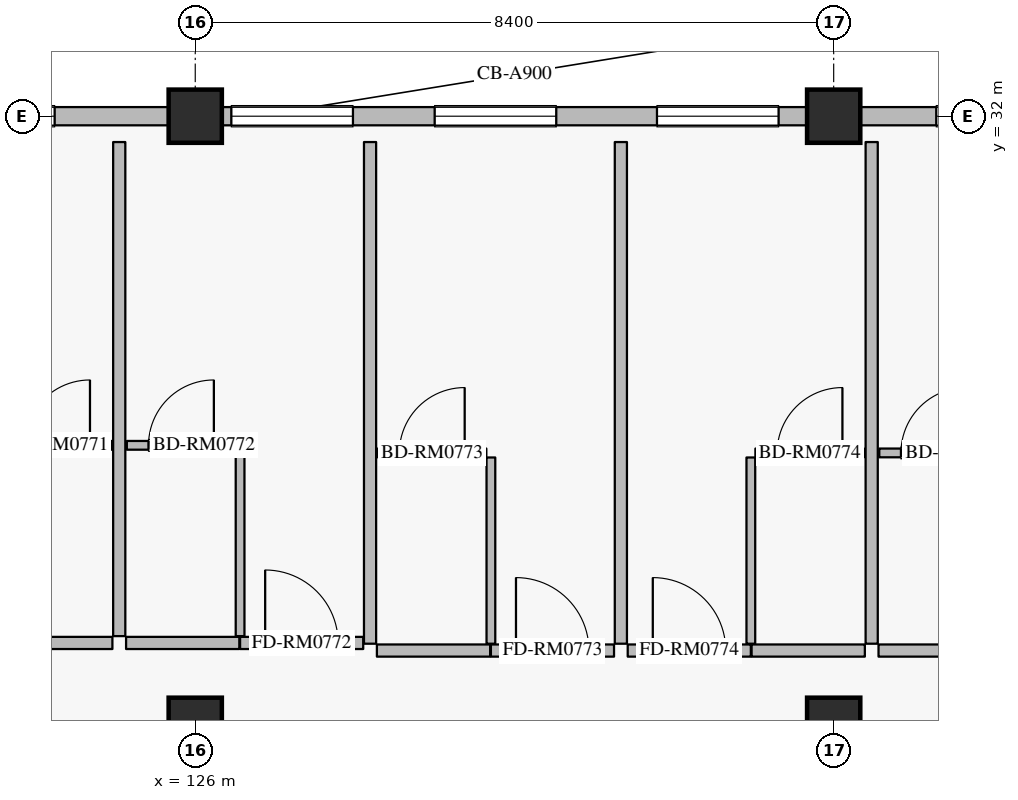
"""IFC4 building model, lengths in metres.
Left out: names, types, materials, properties, quantities, classifications, styles, units other than length and angle.
Written with IfcOpenShell. Run it as: python <this file> out.ifc"""

import sys

from ifc_helpers import new_model, si_unit, direction, frame, frame_2d, origin, origin_2d, place, context, subcontext, project, spatial, rectangle, extrude, element, fill, save


model = new_model("IFC4")
c1 = context("Model", 3, precision=1e-05, world=origin(), true_north=direction((0.0, 1.0)))
c2 = subcontext(c1, "Body", "Model", "MODEL_VIEW")
j1 = project(units=[si_unit("LENGTHUNIT", "METRE"), si_unit("PLANEANGLEUNIT", "RADIAN")], contexts=[c1])
p1 = place(None, origin())
s1 = spatial("IfcSite", under=j1, at=p1, CompositionType="ELEMENT")
p2 = place(p1, origin())
s2 = spatial("IfcBuilding", under=s1, at=p2, CompositionType="ELEMENT")
p3 = place(p2, frame((0.0, 0.0, 28.8)))
s3 = spatial("IfcBuildingStorey", under=s2, at=p3, CompositionType="ELEMENT", Elevation=28.8)
for number, where, z_axis, x_axis in (
    (1, (126.0, 32.0, 0.0), (0.0, 0.0, 1.0), (1.0, 0.0, 0.0)),
    (2, (134.4, 32.0, 0.0), (0.0, 0.0, 1.0), (1.0, 0.0, 0.0)),
    (3, (126.0, 24.0, 0.0), (0.0, 0.0, 1.0), (1.0, 0.0, 0.0)),
    (4, (134.4, 24.0, 0.0), (0.0, 0.0, 1.0), (1.0, 0.0, 0.0)),
):
    element("IfcColumn", number, at=place(p3, frame(where, z_axis=z_axis, x_axis=x_axis)), inside=s3, PredefinedType="COLUMN", context=c2, shape_type="SweptSolid", body=[
        extrude(rectangle(XDim=0.7, YDim=0.7, at=origin_2d()), origin(), (0.0, 0.0, 1.0), 3.6),
    ])
p4 = place(p3, frame((117.95, 32.0, 0.0), z_axis=(0.0, 0.0, 1.0), x_axis=(1.0, 0.0, 0.0)))
e5 = element("IfcWall", 5, at=p4, inside=s3, PredefinedType="SOLIDWALL", context=c2, shape_type="SweptSolid", body=[
    extrude(rectangle(XDim=7.7, YDim=0.24, at=frame_2d((3.85, 0.0))), origin(), (0.0, 0.0, 1.0), 2.93),
])
p5 = place(p4, frame((1.3, 0.0, 0.8)))
e6 = element("IfcOpeningElement", 6, at=p5, cuts=e5, PredefinedType="OPENING", context=c2, shape_type="SweptSolid", body=[
    extrude(rectangle(XDim=1.6, YDim=1.6, at=frame_2d((0.8, 0.8))), frame((0.0, 0.13, 0.0), z_axis=(0.0, -1.0, 0.0), x_axis=(1.0, 0.0, 0.0)), (0.0, 0.0, 1.0), 0.26),
])
p6 = place(p4, frame((4.6, 0.0, 0.8)))
e7 = element("IfcOpeningElement", 7, at=p6, cuts=e5, PredefinedType="OPENING", context=c2, shape_type="SweptSolid", body=[
    extrude(rectangle(XDim=1.6, YDim=1.6, at=frame_2d((0.8, 0.8))), frame((0.0, 0.13, 0.0), z_axis=(0.0, -1.0, 0.0), x_axis=(1.0, 0.0, 0.0)), (0.0, 0.0, 1.0), 0.26),
])
p7 = place(p3, frame((126.35, 32.0, 0.0), z_axis=(0.0, 0.0, 1.0), x_axis=(1.0, 0.0, 0.0)))
e8 = element("IfcWall", 8, at=p7, inside=s3, PredefinedType="SOLIDWALL", context=c2, shape_type="SweptSolid", body=[
    extrude(rectangle(XDim=7.7, YDim=0.24, at=frame_2d((3.85, 0.0))), origin(), (0.0, 0.0, 1.0), 2.93),
])
p8 = place(p7, frame((0.125, 0.0, 0.8)))
e9 = element("IfcOpeningElement", 9, at=p8, cuts=e8, PredefinedType="OPENING", context=c2, shape_type="SweptSolid", body=[
    extrude(rectangle(XDim=1.6, YDim=1.6, at=frame_2d((0.8, 0.8))), frame((0.0, 0.13, 0.0), z_axis=(0.0, -1.0, 0.0), x_axis=(1.0, 0.0, 0.0)), (0.0, 0.0, 1.0), 0.26),
])
p9 = place(p7, frame((2.8, 0.0, 0.8)))
e10 = element("IfcOpeningElement", 10, at=p9, cuts=e8, PredefinedType="OPENING", context=c2, shape_type="SweptSolid", body=[
    extrude(rectangle(XDim=1.6, YDim=1.6, at=frame_2d((0.8, 0.8))), frame((0.0, 0.13, 0.0), z_axis=(0.0, -1.0, 0.0), x_axis=(1.0, 0.0, 0.0)), (0.0, 0.0, 1.0), 0.26),
])
p10 = place(p7, frame((5.725, 0.0, 0.8)))
e11 = element("IfcOpeningElement", 11, at=p10, cuts=e8, PredefinedType="OPENING", context=c2, shape_type="SweptSolid", body=[
    extrude(rectangle(XDim=1.6, YDim=1.6, at=frame_2d((0.8, 0.8))), frame((0.0, 0.13, 0.0), z_axis=(0.0, -1.0, 0.0), x_axis=(1.0, 0.0, 0.0)), (0.0, 0.0, 1.0), 0.26),
])
p11 = place(p3, frame((134.75, 32.0, 0.0), z_axis=(0.0, 0.0, 1.0), x_axis=(1.0, 0.0, 0.0)))
e12 = element("IfcWall", 12, at=p11, inside=s3, PredefinedType="SOLIDWALL", context=c2, shape_type="SweptSolid", body=[
    extrude(rectangle(XDim=7.7, YDim=0.24, at=frame_2d((3.85, 0.0))), origin(), (0.0, 0.0, 1.0), 2.93),
])
p12 = place(p11, frame((1.0, 0.0, 0.8)))
e13 = element("IfcOpeningElement", 13, at=p12, cuts=e12, PredefinedType="OPENING", context=c2, shape_type="SweptSolid", body=[
    extrude(rectangle(XDim=1.6, YDim=1.6, at=frame_2d((0.8, 0.8))), frame((0.0, 0.13, 0.0), z_axis=(0.0, -1.0, 0.0), x_axis=(1.0, 0.0, 0.0)), (0.0, 0.0, 1.0), 0.26),
])
p13 = place(p11, frame((4.3, 0.0, 0.8)))
e14 = element("IfcOpeningElement", 14, at=p13, cuts=e12, PredefinedType="OPENING", context=c2, shape_type="SweptSolid", body=[
    extrude(rectangle(XDim=1.6, YDim=1.6, at=frame_2d((0.8, 0.8))), frame((0.0, 0.13, 0.0), z_axis=(0.0, -1.0, 0.0), x_axis=(1.0, 0.0, 0.0)), (0.0, 0.0, 1.0), 0.26),
])
p14 = place(p3, frame((123.42, 25.07, 0.0), z_axis=(0.0, 0.0, 1.0), x_axis=(1.0, 0.0, 0.0)))
e15 = element("IfcWall", 15, at=p14, inside=s3, PredefinedType="PARTITIONING", context=c2, shape_type="SweptSolid", body=[
    extrude(rectangle(XDim=1.49, YDim=0.16, at=frame_2d((0.745, 0.0))), origin(), (0.0, 0.0, 1.0), 3.365),
])
p15 = place(p3, frame((123.47, 27.67, 0.0), z_axis=(0.0, 0.0, 1.0), x_axis=(1.0, 0.0, 0.0)))
e16 = element("IfcWall", 16, at=p15, inside=s3, PredefinedType="PARTITIONING", context=c2, shape_type="SweptSolid", body=[
    extrude(rectangle(XDim=1.43, YDim=0.115, at=frame_2d((0.715, 0.0))), origin(), (0.0, 0.0, 1.0), 3.365),
])
p16 = place(p15, frame((0.285, 0.0, 0.0)))
e17 = element("IfcOpeningElement", 17, at=p16, cuts=e16, PredefinedType="OPENING", context=c2, shape_type="SweptSolid", body=[
    extrude(rectangle(XDim=0.86, YDim=2.12, at=frame_2d((0.43, 1.06))), frame((0.0, 0.067, 0.0), z_axis=(0.0, -1.0, 0.0), x_axis=(1.0, 0.0, 0.0)), (0.0, 0.0, 1.0), 0.135),
])
p17 = place(p3, frame((125.09, 25.07, 0.0), z_axis=(0.0, 0.0, 1.0), x_axis=(1.0, 0.0, 0.0)))
e18 = element("IfcWall", 18, at=p17, inside=s3, PredefinedType="PARTITIONING", context=c2, shape_type="SweptSolid", body=[
    extrude(rectangle(XDim=1.49, YDim=0.16, at=frame_2d((0.745, 0.0))), origin(), (0.0, 0.0, 1.0), 3.365),
])
p18 = place(p3, frame((126.59, 25.07, 0.0), z_axis=(0.0, 0.0, 1.0), x_axis=(1.0, 0.0, 0.0)))
e19 = element("IfcWall", 19, at=p18, inside=s3, PredefinedType="PARTITIONING", context=c2, shape_type="SweptSolid", body=[
    extrude(rectangle(XDim=1.62, YDim=0.16, at=frame_2d((0.81, 0.0))), origin(), (0.0, 0.0, 1.0), 3.365),
])
p19 = place(p18, frame((0.33, 0.0, 0.0)))
e20 = element("IfcOpeningElement", 20, at=p19, cuts=e19, PredefinedType="OPENING", context=c2, shape_type="SweptSolid", body=[
    extrude(rectangle(XDim=0.96, YDim=2.2, at=frame_2d((0.48, 1.1))), frame((0.0, 0.09, 0.0), z_axis=(0.0, -1.0, 0.0), x_axis=(1.0, 0.0, 0.0)), (0.0, 0.0, 1.0), 0.18),
])
p20 = place(p3, frame((126.59, 25.16, 0.0), z_axis=(0.0, 0.0, 1.0), x_axis=(0.0, 1.0, 0.0)))
e21 = element("IfcWall", 21, at=p20, inside=s3, PredefinedType="PARTITIONING", context=c2, shape_type="SweptSolid", body=[
    extrude(rectangle(XDim=2.45, YDim=0.115, at=frame_2d((1.225, 0.0))), origin(), (0.0, 0.0, 1.0), 3.365),
])
p21 = place(p3, frame((125.1, 27.67, 0.0), z_axis=(0.0, 0.0, 1.0), x_axis=(1.0, 0.0, 0.0)))
e22 = element("IfcWall", 22, at=p21, inside=s3, PredefinedType="PARTITIONING", context=c2, shape_type="SweptSolid", body=[
    extrude(rectangle(XDim=1.43, YDim=0.115, at=frame_2d((0.715, 0.0))), origin(), (0.0, 0.0, 1.0), 3.365),
])
p22 = place(p21, frame((0.285, 0.0, 0.0)))
e23 = element("IfcOpeningElement", 23, at=p22, cuts=e22, PredefinedType="OPENING", context=c2, shape_type="SweptSolid", body=[
    extrude(rectangle(XDim=0.86, YDim=2.12, at=frame_2d((0.43, 1.06))), frame((0.0, 0.067, 0.0), z_axis=(0.0, -1.0, 0.0), x_axis=(1.0, 0.0, 0.0)), (0.0, 0.0, 1.0), 0.135),
])
p23 = place(p3, frame((125.0, 25.16, 0.0), z_axis=(0.0, 0.0, 1.0), x_axis=(0.0, 1.0, 0.0)))
e24 = element("IfcWall", 24, at=p23, inside=s3, PredefinedType="PARTITIONING", context=c2, shape_type="SweptSolid", body=[
    extrude(rectangle(XDim=6.5, YDim=0.16, at=frame_2d((3.25, 0.0))), origin(), (0.0, 0.0, 1.0), 3.365),
])
p24 = place(p3, frame((128.39, 24.97, 0.0), z_axis=(0.0, 0.0, 1.0), x_axis=(1.0, 0.0, 0.0)))
e25 = element("IfcWall", 25, at=p24, inside=s3, PredefinedType="PARTITIONING", context=c2, shape_type="SweptSolid", body=[
    extrude(rectangle(XDim=1.49, YDim=0.16, at=frame_2d((0.745, 0.0))), origin(), (0.0, 0.0, 1.0), 3.365),
])
p25 = place(p3, frame((129.89, 24.97, 0.0), z_axis=(0.0, 0.0, 1.0), x_axis=(1.0, 0.0, 0.0)))
e26 = element("IfcWall", 26, at=p25, inside=s3, PredefinedType="PARTITIONING", context=c2, shape_type="SweptSolid", body=[
    extrude(rectangle(XDim=1.62, YDim=0.16, at=frame_2d((0.81, 0.0))), origin(), (0.0, 0.0, 1.0), 3.365),
])
p26 = place(p25, frame((0.33, 0.0, 0.0)))
e27 = element("IfcOpeningElement", 27, at=p26, cuts=e26, PredefinedType="OPENING", context=c2, shape_type="SweptSolid", body=[
    extrude(rectangle(XDim=0.96, YDim=2.2, at=frame_2d((0.48, 1.1))), frame((0.0, 0.09, 0.0), z_axis=(0.0, -1.0, 0.0), x_axis=(1.0, 0.0, 0.0)), (0.0, 0.0, 1.0), 0.18),
])
p27 = place(p3, frame((129.89, 25.06, 0.0), z_axis=(0.0, 0.0, 1.0), x_axis=(0.0, 1.0, 0.0)))
e28 = element("IfcWall", 28, at=p27, inside=s3, PredefinedType="PARTITIONING", context=c2, shape_type="SweptSolid", body=[
    extrude(rectangle(XDim=2.45, YDim=0.115, at=frame_2d((1.225, 0.0))), origin(), (0.0, 0.0, 1.0), 3.365),
])
p28 = place(p3, frame((128.4, 27.57, 0.0), z_axis=(0.0, 0.0, 1.0), x_axis=(1.0, 0.0, 0.0)))
e29 = element("IfcWall", 29, at=p28, inside=s3, PredefinedType="PARTITIONING", context=c2, shape_type="SweptSolid", body=[
    extrude(rectangle(XDim=1.43, YDim=0.115, at=frame_2d((0.715, 0.0))), origin(), (0.0, 0.0, 1.0), 3.365),
])
p29 = place(p28, frame((0.285, 0.0, 0.0)))
e30 = element("IfcOpeningElement", 30, at=p29, cuts=e29, PredefinedType="OPENING", context=c2, shape_type="SweptSolid", body=[
    extrude(rectangle(XDim=0.86, YDim=2.12, at=frame_2d((0.43, 1.06))), frame((0.0, 0.067, 0.0), z_axis=(0.0, -1.0, 0.0), x_axis=(1.0, 0.0, 0.0)), (0.0, 0.0, 1.0), 0.135),
])
p30 = place(p3, frame((128.3, 25.06, 0.0), z_axis=(0.0, 0.0, 1.0), x_axis=(0.0, 1.0, 0.0)))
e31 = element("IfcWall", 31, at=p30, inside=s3, PredefinedType="PARTITIONING", context=c2, shape_type="SweptSolid", body=[
    extrude(rectangle(XDim=6.6, YDim=0.16, at=frame_2d((3.3, 0.0))), origin(), (0.0, 0.0, 1.0), 3.365),
])
p31 = place(p3, frame((131.69, 24.97, 0.0), z_axis=(0.0, 0.0, 1.0), x_axis=(1.0, 0.0, 0.0)))
e32 = element("IfcWall", 32, at=p31, inside=s3, PredefinedType="PARTITIONING", context=c2, shape_type="SweptSolid", body=[
    extrude(rectangle(XDim=1.62, YDim=0.16, at=frame_2d((0.81, 0.0))), origin(), (0.0, 0.0, 1.0), 3.365),
])
p32 = place(p31, frame((0.33, 0.0, 0.0)))
e33 = element("IfcOpeningElement", 33, at=p32, cuts=e32, PredefinedType="OPENING", context=c2, shape_type="SweptSolid", body=[
    extrude(rectangle(XDim=0.96, YDim=2.2, at=frame_2d((0.48, 1.1))), frame((0.0, 0.09, 0.0), z_axis=(0.0, -1.0, 0.0), x_axis=(1.0, 0.0, 0.0)), (0.0, 0.0, 1.0), 0.18),
])
p33 = place(p3, frame((133.32, 24.97, 0.0), z_axis=(0.0, 0.0, 1.0), x_axis=(1.0, 0.0, 0.0)))
e34 = element("IfcWall", 34, at=p33, inside=s3, PredefinedType="PARTITIONING", context=c2, shape_type="SweptSolid", body=[
    extrude(rectangle(XDim=1.49, YDim=0.16, at=frame_2d((0.745, 0.0))), origin(), (0.0, 0.0, 1.0), 3.365),
])
p34 = place(p3, frame((133.31, 25.06, 0.0), z_axis=(0.0, 0.0, 1.0), x_axis=(0.0, 1.0, 0.0)))
e35 = element("IfcWall", 35, at=p34, inside=s3, PredefinedType="PARTITIONING", context=c2, shape_type="SweptSolid", body=[
    extrude(rectangle(XDim=2.45, YDim=0.115, at=frame_2d((1.225, 0.0))), origin(), (0.0, 0.0, 1.0), 3.365),
])
p35 = place(p3, frame((133.37, 27.57, 0.0), z_axis=(0.0, 0.0, 1.0), x_axis=(1.0, 0.0, 0.0)))
e36 = element("IfcWall", 36, at=p35, inside=s3, PredefinedType="PARTITIONING", context=c2, shape_type="SweptSolid", body=[
    extrude(rectangle(XDim=1.43, YDim=0.115, at=frame_2d((0.715, 0.0))), origin(), (0.0, 0.0, 1.0), 3.365),
])
p36 = place(p35, frame((0.285, 0.0, 0.0)))
e37 = element("IfcOpeningElement", 37, at=p36, cuts=e36, PredefinedType="OPENING", context=c2, shape_type="SweptSolid", body=[
    extrude(rectangle(XDim=0.86, YDim=2.12, at=frame_2d((0.43, 1.06))), frame((0.0, 0.067, 0.0), z_axis=(0.0, -1.0, 0.0), x_axis=(1.0, 0.0, 0.0)), (0.0, 0.0, 1.0), 0.135),
])
p37 = place(p3, frame((131.6, 25.06, 0.0), z_axis=(0.0, 0.0, 1.0), x_axis=(0.0, 1.0, 0.0)))
e38 = element("IfcWall", 38, at=p37, inside=s3, PredefinedType="PARTITIONING", context=c2, shape_type="SweptSolid", body=[
    extrude(rectangle(XDim=6.6, YDim=0.16, at=frame_2d((3.3, 0.0))), origin(), (0.0, 0.0, 1.0), 3.365),
])
p38 = place(p3, frame((134.99, 24.97, 0.0), z_axis=(0.0, 0.0, 1.0), x_axis=(1.0, 0.0, 0.0)))
e39 = element("IfcWall", 39, at=p38, inside=s3, PredefinedType="PARTITIONING", context=c2, shape_type="SweptSolid", body=[
    extrude(rectangle(XDim=1.49, YDim=0.16, at=frame_2d((0.745, 0.0))), origin(), (0.0, 0.0, 1.0), 3.365),
])
p39 = place(p3, frame((135.0, 27.57, 0.0), z_axis=(0.0, 0.0, 1.0), x_axis=(1.0, 0.0, 0.0)))
e40 = element("IfcWall", 40, at=p39, inside=s3, PredefinedType="PARTITIONING", context=c2, shape_type="SweptSolid", body=[
    extrude(rectangle(XDim=1.43, YDim=0.115, at=frame_2d((0.715, 0.0))), origin(), (0.0, 0.0, 1.0), 3.365),
])
p40 = place(p39, frame((0.285, 0.0, 0.0)))
e41 = element("IfcOpeningElement", 41, at=p40, cuts=e40, PredefinedType="OPENING", context=c2, shape_type="SweptSolid", body=[
    extrude(rectangle(XDim=0.86, YDim=2.12, at=frame_2d((0.43, 1.06))), frame((0.0, 0.067, 0.0), z_axis=(0.0, -1.0, 0.0), x_axis=(1.0, 0.0, 0.0)), (0.0, 0.0, 1.0), 0.135),
])
p41 = place(p3, frame((134.9, 25.06, 0.0), z_axis=(0.0, 0.0, 1.0), x_axis=(0.0, 1.0, 0.0)))
e42 = element("IfcWall", 42, at=p41, inside=s3, PredefinedType="PARTITIONING", context=c2, shape_type="SweptSolid", body=[
    extrude(rectangle(XDim=6.6, YDim=0.16, at=frame_2d((3.3, 0.0))), origin(), (0.0, 0.0, 1.0), 3.365),
])
p42 = place(p6, origin())
e43 = element("IfcWindow", 43, at=p42, inside=s3, PartitioningType="SINGLE_PANEL", PredefinedType="WINDOW", context=c2, shape_type="SweptSolid", body=[
    extrude(rectangle(XDim=1.6, YDim=1.6, at=frame_2d((0.8, 0.8))), frame((0.0, 0.03, 0.0), z_axis=(0.0, -1.0, 0.0), x_axis=(1.0, 0.0, 0.0)), (0.0, 0.0, 1.0), 0.06),
])
fill(e7, e43)
p43 = place(p8, origin())
e44 = element("IfcWindow", 44, at=p43, inside=s3, PartitioningType="SINGLE_PANEL", PredefinedType="WINDOW", context=c2, shape_type="SweptSolid", body=[
    extrude(rectangle(XDim=1.6, YDim=1.6, at=frame_2d((0.8, 0.8))), frame((0.0, 0.03, 0.0), z_axis=(0.0, -1.0, 0.0), x_axis=(1.0, 0.0, 0.0)), (0.0, 0.0, 1.0), 0.06),
])
fill(e9, e44)
p44 = place(p9, origin())
e45 = element("IfcWindow", 45, at=p44, inside=s3, PartitioningType="SINGLE_PANEL", PredefinedType="WINDOW", context=c2, shape_type="SweptSolid", body=[
    extrude(rectangle(XDim=1.6, YDim=1.6, at=frame_2d((0.8, 0.8))), frame((0.0, 0.03, 0.0), z_axis=(0.0, -1.0, 0.0), x_axis=(1.0, 0.0, 0.0)), (0.0, 0.0, 1.0), 0.06),
])
fill(e10, e45)
p45 = place(p10, origin())
e46 = element("IfcWindow", 46, at=p45, inside=s3, PartitioningType="SINGLE_PANEL", PredefinedType="WINDOW", context=c2, shape_type="SweptSolid", body=[
    extrude(rectangle(XDim=1.6, YDim=1.6, at=frame_2d((0.8, 0.8))), frame((0.0, 0.03, 0.0), z_axis=(0.0, -1.0, 0.0), x_axis=(1.0, 0.0, 0.0)), (0.0, 0.0, 1.0), 0.06),
])
fill(e11, e46)
p46 = place(p12, origin())
e47 = element("IfcWindow", 47, at=p46, inside=s3, PartitioningType="SINGLE_PANEL", PredefinedType="WINDOW", context=c2, shape_type="SweptSolid", body=[
    extrude(rectangle(XDim=1.6, YDim=1.6, at=frame_2d((0.8, 0.8))), frame((0.0, 0.03, 0.0), z_axis=(0.0, -1.0, 0.0), x_axis=(1.0, 0.0, 0.0)), (0.0, 0.0, 1.0), 0.06),
])
fill(e13, e47)
p47 = place(p16, origin())
e48 = element("IfcDoor", 48, at=p47, inside=s3, OperationType="SINGLE_SWING_RIGHT", PredefinedType="DOOR", context=c2, shape_type="SweptSolid", body=[
    extrude(rectangle(XDim=0.86, YDim=2.12, at=frame_2d((0.43, 1.06))), frame((0.0, 0.025, 0.0), z_axis=(0.0, -1.0, 0.0), x_axis=(1.0, 0.0, 0.0)), (0.0, 0.0, 1.0), 0.05),
])
fill(e17, e48)
p48 = place(p19, origin())
e49 = element("IfcDoor", 49, at=p48, inside=s3, OperationType="SINGLE_SWING_LEFT", PredefinedType="DOOR", context=c2, shape_type="SweptSolid", body=[
    extrude(rectangle(XDim=0.96, YDim=2.2, at=frame_2d((0.48, 1.1))), frame((0.0, 0.025, 0.0), z_axis=(0.0, -1.0, 0.0), x_axis=(1.0, 0.0, 0.0)), (0.0, 0.0, 1.0), 0.05),
])
fill(e20, e49)
p49 = place(p22, origin())
e50 = element("IfcDoor", 50, at=p49, inside=s3, OperationType="SINGLE_SWING_RIGHT", PredefinedType="DOOR", context=c2, shape_type="SweptSolid", body=[
    extrude(rectangle(XDim=0.86, YDim=2.12, at=frame_2d((0.43, 1.06))), frame((0.0, 0.025, 0.0), z_axis=(0.0, -1.0, 0.0), x_axis=(1.0, 0.0, 0.0)), (0.0, 0.0, 1.0), 0.05),
])
fill(e23, e50)
p50 = place(p26, origin())
e51 = element("IfcDoor", 51, at=p50, inside=s3, OperationType="SINGLE_SWING_LEFT", PredefinedType="DOOR", context=c2, shape_type="SweptSolid", body=[
    extrude(rectangle(XDim=0.96, YDim=2.2, at=frame_2d((0.48, 1.1))), frame((0.0, 0.025, 0.0), z_axis=(0.0, -1.0, 0.0), x_axis=(1.0, 0.0, 0.0)), (0.0, 0.0, 1.0), 0.05),
])
fill(e27, e51)
p51 = place(p29, origin())
e52 = element("IfcDoor", 52, at=p51, inside=s3, OperationType="SINGLE_SWING_RIGHT", PredefinedType="DOOR", context=c2, shape_type="SweptSolid", body=[
    extrude(rectangle(XDim=0.86, YDim=2.12, at=frame_2d((0.43, 1.06))), frame((0.0, 0.025, 0.0), z_axis=(0.0, -1.0, 0.0), x_axis=(1.0, 0.0, 0.0)), (0.0, 0.0, 1.0), 0.05),
])
fill(e30, e52)
p52 = place(p32, origin())
e53 = element("IfcDoor", 53, at=p52, inside=s3, OperationType="SINGLE_SWING_LEFT", PredefinedType="DOOR", context=c2, shape_type="SweptSolid", body=[
    extrude(rectangle(XDim=0.96, YDim=2.2, at=frame_2d((0.48, 1.1))), frame((0.0, 0.025, 0.0), z_axis=(0.0, -1.0, 0.0), x_axis=(1.0, 0.0, 0.0)), (0.0, 0.0, 1.0), 0.05),
])
fill(e33, e53)
p53 = place(p36, origin())
e54 = element("IfcDoor", 54, at=p53, inside=s3, OperationType="SINGLE_SWING_RIGHT", PredefinedType="DOOR", context=c2, shape_type="SweptSolid", body=[
    extrude(rectangle(XDim=0.86, YDim=2.12, at=frame_2d((0.43, 1.06))), frame((0.0, 0.025, 0.0), z_axis=(0.0, -1.0, 0.0), x_axis=(1.0, 0.0, 0.0)), (0.0, 0.0, 1.0), 0.05),
])
fill(e37, e54)
p54 = place(p40, origin())
e55 = element("IfcDoor", 55, at=p54, inside=s3, OperationType="SINGLE_SWING_RIGHT", PredefinedType="DOOR", context=c2, shape_type="SweptSolid", body=[
    extrude(rectangle(XDim=0.86, YDim=2.12, at=frame_2d((0.43, 1.06))), frame((0.0, 0.025, 0.0), z_axis=(0.0, -1.0, 0.0), x_axis=(1.0, 0.0, 0.0)), (0.0, 0.0, 1.0), 0.05),
])
fill(e41, e55)
save(model, sys.argv[1])
